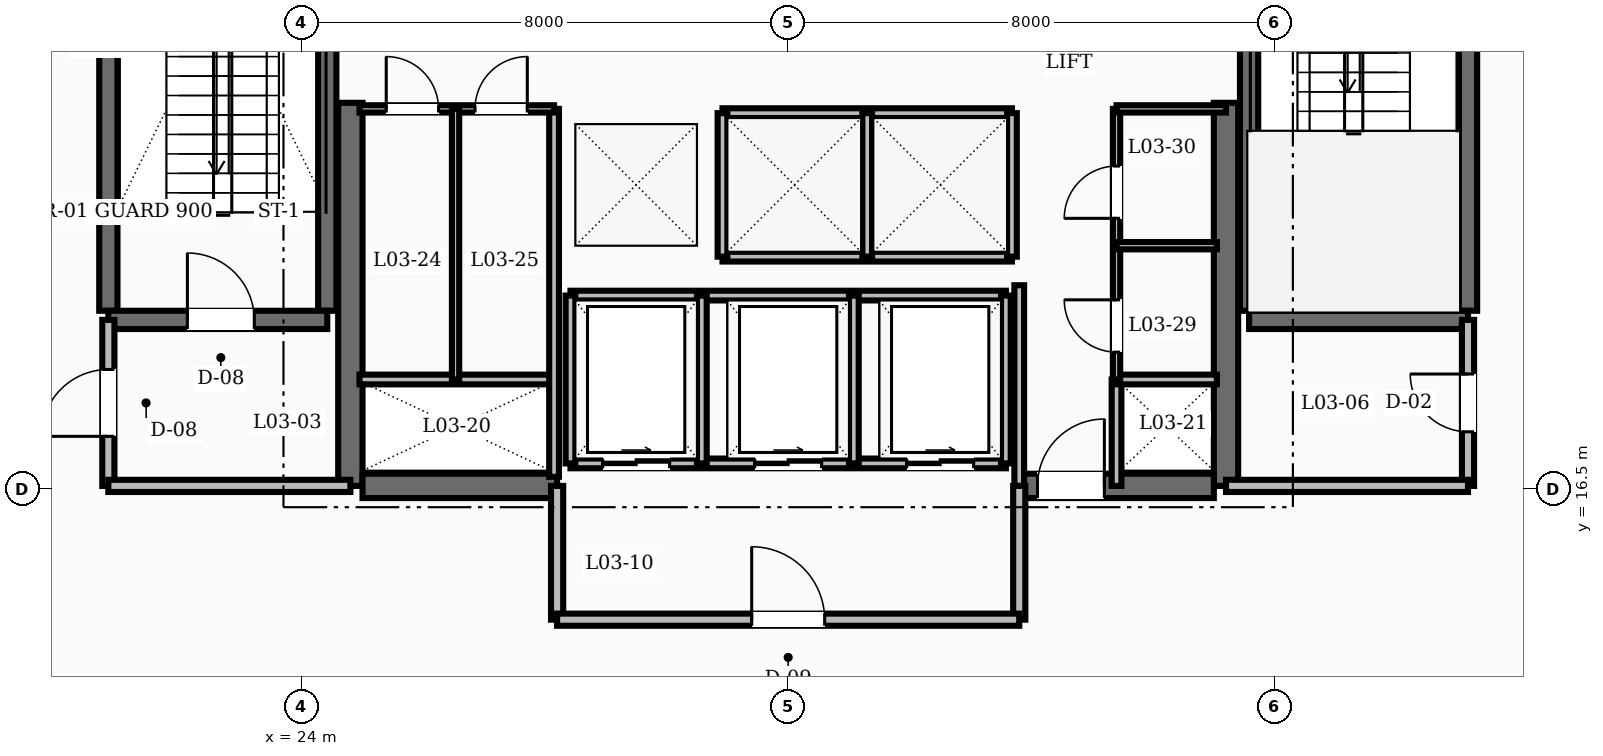
"""IFC4 building model, lengths in metres.
Left out: names, types, materials, properties, quantities, classifications, styles, units other than length and angle.
Written with IfcOpenShell. Run it as: python <this file> out.ifc"""

import sys

from ifc_helpers import new_model, si_unit, direction, frame, frame_2d, origin, place, context, subcontext, project, spatial, rectangle, extrude, element, fill, save


model = new_model("IFC4")
c1 = context("Model", 3, precision=1e-05, world=origin(), true_north=direction((0.0, 1.0)))
c2 = subcontext(c1, "Body", "Model", "MODEL_VIEW")
j1 = project(units=[si_unit("LENGTHUNIT", "METRE"), si_unit("PLANEANGLEUNIT", "RADIAN")], contexts=[c1])
p1 = place(None, origin())
s1 = spatial("IfcSite", under=j1, at=p1, CompositionType="ELEMENT")
p2 = place(p1, origin())
s2 = spatial("IfcBuilding", under=s1, at=p2, CompositionType="ELEMENT")
p3 = place(p2, frame((0.0, 0.0, 14.8)))
s3 = spatial("IfcBuildingStorey", under=s2, at=p3, CompositionType="ELEMENT", Elevation=14.8)
for number, where, z_axis, x_axis in (
    (1, (24.8, 16.55, 0.0), (0.0, 0.0, 1.0), (0.0, 1.0, 0.0)),
    (2, (39.2, 16.55, 0.0), (0.0, 0.0, 1.0), (0.0, 1.0, 0.0)),
):
    element("IfcWall", number, at=place(p3, frame(where, z_axis=z_axis, x_axis=x_axis)), inside=s3, PredefinedType="SHEAR", context=c2, shape_type="SweptSolid", body=[
        extrude(rectangle(XDim=6.3, YDim=0.4, at=frame_2d((3.15, 0.0))), origin(), (0.0, 0.0, 1.0), 4.8),
    ])
p4 = place(p3, frame((25.0, 16.55, 0.0), z_axis=(0.0, 0.0, 1.0), x_axis=(1.0, 0.0, 0.0)))
e3 = element("IfcWall", 3, at=p4, inside=s3, PredefinedType="SHEAR", context=c2, shape_type="SweptSolid", body=[
    extrude(rectangle(XDim=3.2, YDim=0.4, at=frame_2d((1.6, 0.0))), origin(), (0.0, 0.0, 1.0), 4.8),
])
p5 = place(p3, frame((35.8, 16.55, 0.0), z_axis=(0.0, 0.0, 1.0), x_axis=(1.0, 0.0, 0.0)))
e4 = element("IfcWall", 4, at=p5, inside=s3, PredefinedType="SHEAR", context=c2, shape_type="SweptSolid", body=[
    extrude(rectangle(XDim=3.2, YDim=0.4, at=frame_2d((1.6, 0.0))), origin(), (0.0, 0.0, 1.0), 4.8),
])
p6 = place(p5, frame((0.3, 0.0, 0.0)))
e5 = element("IfcOpeningElement", 5, at=p6, cuts=e4, PredefinedType="OPENING", context=c2, shape_type="SweptSolid", body=[
    extrude(rectangle(XDim=1.1, YDim=2.1, at=frame_2d((0.55, 1.05))), frame((0.0, 0.21, 0.0), z_axis=(0.0, -1.0, 0.0), x_axis=(1.0, 0.0, 0.0)), (0.0, 0.0, 1.0), 0.42),
])
for number, where, z_axis, x_axis in (
    (6, (20.82, 19.43, 0.0), (0.0, 0.0, 1.0), (0.0, 1.0, 0.0)),
    (7, (24.42, 19.43, 0.0), (0.0, 0.0, 1.0), (0.0, 1.0, 0.0)),
):
    element("IfcWall", number, at=place(p3, frame(where, z_axis=z_axis, x_axis=x_axis)), inside=s3, PredefinedType="SHEAR", context=c2, shape_type="SweptSolid", body=[
        extrude(rectangle(XDim=8.74, YDim=0.3, at=frame_2d((4.37, 0.0))), origin(), (0.0, 0.0, 1.0), 4.8),
    ])
p7 = place(p3, frame((20.82, 19.28, 0.0), z_axis=(0.0, 0.0, 1.0), x_axis=(1.0, 0.0, 0.0)))
e8 = element("IfcWall", 8, at=p7, inside=s3, PredefinedType="SHEAR", context=c2, shape_type="SweptSolid", body=[
    extrude(rectangle(XDim=3.6, YDim=0.3, at=frame_2d((1.8, 0.0))), origin(), (0.0, 0.0, 1.0), 4.8),
])
p8 = place(p7, frame((1.3, 0.0, 0.0)))
e9 = element("IfcOpeningElement", 9, at=p8, cuts=e8, PredefinedType="OPENING", context=c2, shape_type="SweptSolid", body=[
    extrude(rectangle(XDim=1.1, YDim=2.1, at=frame_2d((0.55, 1.05))), frame((0.0, 0.16, 0.0), z_axis=(0.0, -1.0, 0.0), x_axis=(1.0, 0.0, 0.0)), (0.0, 0.0, 1.0), 0.32),
])
for number, where, z_axis, x_axis in (
    (10, (43.18, 19.43, 0.0), (0.0, 0.0, 1.0), (0.0, 1.0, 0.0)),
    (11, (39.58, 19.43, 0.0), (0.0, 0.0, 1.0), (0.0, 1.0, 0.0)),
):
    element("IfcWall", number, at=place(p3, frame(where, z_axis=z_axis, x_axis=x_axis)), inside=s3, PredefinedType="SHEAR", context=c2, shape_type="SweptSolid", body=[
        extrude(rectangle(XDim=8.74, YDim=0.3, at=frame_2d((4.37, 0.0))), origin(), (0.0, 0.0, 1.0), 4.8),
    ])
p9 = place(p3, frame((39.58, 19.28, 0.0), z_axis=(0.0, 0.0, 1.0), x_axis=(1.0, 0.0, 0.0)))
e12 = element("IfcWall", 12, at=p9, inside=s3, PredefinedType="SHEAR", context=c2, shape_type="SweptSolid", body=[
    extrude(rectangle(XDim=3.6, YDim=0.3, at=frame_2d((1.8, 0.0))), origin(), (0.0, 0.0, 1.0), 4.8),
])
p10 = place(p3, frame((20.82, 16.55, 0.0), z_axis=(0.0, 0.0, 1.0), x_axis=(0.0, 1.0, 0.0)))
e13 = element("IfcWall", 13, at=p10, inside=s3, PredefinedType="SOLIDWALL", context=c2, shape_type="SweptSolid", body=[
    extrude(rectangle(XDim=2.73, YDim=0.2, at=frame_2d((1.365, 0.0))), origin(), (0.0, 0.0, 1.0), 3.52),
])
p11 = place(p10, frame((0.815, 0.0, 0.0)))
e14 = element("IfcOpeningElement", 14, at=p11, cuts=e13, PredefinedType="OPENING", context=c2, shape_type="SweptSolid", body=[
    extrude(rectangle(XDim=1.1, YDim=2.1, at=frame_2d((0.55, 1.05))), frame((0.0, 0.11, 0.0), z_axis=(0.0, -1.0, 0.0), x_axis=(1.0, 0.0, 0.0)), (0.0, 0.0, 1.0), 0.22),
])
p12 = place(p3, frame((20.82, 16.55, 0.0), z_axis=(0.0, 0.0, 1.0), x_axis=(1.0, 0.0, 0.0)))
e15 = element("IfcWall", 15, at=p12, inside=s3, PredefinedType="SOLIDWALL", context=c2, shape_type="SweptSolid", body=[
    extrude(rectangle(XDim=3.98, YDim=0.2, at=frame_2d((1.99, 0.0))), origin(), (0.0, 0.0, 1.0), 3.52),
])
p13 = place(p3, frame((43.18, 16.55, 0.0), z_axis=(0.0, 0.0, 1.0), x_axis=(0.0, 1.0, 0.0)))
e16 = element("IfcWall", 16, at=p13, inside=s3, PredefinedType="SOLIDWALL", context=c2, shape_type="SweptSolid", body=[
    extrude(rectangle(XDim=2.73, YDim=0.2, at=frame_2d((1.365, 0.0))), origin(), (0.0, 0.0, 1.0), 3.52),
])
p14 = place(p13, frame((0.89, 0.0, 0.0)))
e17 = element("IfcOpeningElement", 17, at=p14, cuts=e16, PredefinedType="OPENING", context=c2, shape_type="SweptSolid", body=[
    extrude(rectangle(XDim=0.95, YDim=2.1, at=frame_2d((0.475, 1.05))), frame((0.0, 0.11, 0.0), z_axis=(0.0, -1.0, 0.0), x_axis=(1.0, 0.0, 0.0)), (0.0, 0.0, 1.0), 0.22),
])
p15 = place(p3, frame((39.2, 16.55, 0.0), z_axis=(0.0, 0.0, 1.0), x_axis=(1.0, 0.0, 0.0)))
e18 = element("IfcWall", 18, at=p15, inside=s3, PredefinedType="SOLIDWALL", context=c2, shape_type="SweptSolid", body=[
    extrude(rectangle(XDim=3.98, YDim=0.2, at=frame_2d((1.99, 0.0))), origin(), (0.0, 0.0, 1.0), 3.52),
])
p16 = place(p3, frame((35.8, 16.55, 0.0), z_axis=(0.0, 0.0, 1.0), x_axis=(0.0, 1.0, 0.0)))
e19 = element("IfcWall", 19, at=p16, inside=s3, PredefinedType="SOLIDWALL", context=c2, shape_type="SweptSolid", body=[
    extrude(rectangle(XDim=3.3, YDim=0.16, at=frame_2d((1.65, 0.0))), origin(), (0.0, 0.0, 1.0), 3.52),
])
p17 = place(p3, frame((37.4, 16.55, 0.0), z_axis=(0.0, 0.0, 1.0), x_axis=(0.0, 1.0, 0.0)))
e20 = element("IfcWall", 20, at=p17, inside=s3, PredefinedType="SOLIDWALL", context=c2, shape_type="SweptSolid", body=[
    extrude(rectangle(XDim=1.75, YDim=0.16, at=frame_2d((0.875, 0.0))), origin(), (0.0, 0.0, 1.0), 3.52),
])
for number, where, z_axis, x_axis in (
    (21, (28.2, 14.35, 0.0), (0.0, 0.0, 1.0), (0.0, 1.0, 0.0)),
    (22, (35.8, 14.35, 0.0), (0.0, 0.0, 1.0), (0.0, 1.0, 0.0)),
):
    element("IfcWall", number, at=place(p3, frame(where, z_axis=z_axis, x_axis=x_axis)), inside=s3, PredefinedType="SOLIDWALL", context=c2, shape_type="SweptSolid", body=[
        extrude(rectangle(XDim=2.2, YDim=0.2, at=frame_2d((1.1, 0.0))), origin(), (0.0, 0.0, 1.0), 3.52),
    ])
p18 = place(p3, frame((28.2, 14.35, 0.0), z_axis=(0.0, 0.0, 1.0), x_axis=(1.0, 0.0, 0.0)))
e23 = element("IfcWall", 23, at=p18, inside=s3, PredefinedType="SOLIDWALL", context=c2, shape_type="SweptSolid", body=[
    extrude(rectangle(XDim=7.6, YDim=0.2, at=frame_2d((3.8, 0.0))), origin(), (0.0, 0.0, 1.0), 3.52),
])
p19 = place(p18, frame((3.2, 0.0, 0.0)))
e24 = element("IfcOpeningElement", 24, at=p19, cuts=e23, PredefinedType="OPENING", context=c2, shape_type="SweptSolid", body=[
    extrude(rectangle(XDim=1.2, YDim=2.1, at=frame_2d((0.6, 1.05))), frame((0.0, 0.11, 0.0), z_axis=(0.0, -1.0, 0.0), x_axis=(1.0, 0.0, 0.0)), (0.0, 0.0, 1.0), 0.22),
])
for number, where, z_axis, x_axis in (
    (25, (30.92, 22.68, 0.0), (0.0, 0.0, 1.0), (1.0, 0.0, 0.0)),
    (26, (30.92, 20.32, 0.0), (0.0, 0.0, 1.0), (1.0, 0.0, 0.0)),
):
    element("IfcWall", number, at=place(p3, frame(where, z_axis=z_axis, x_axis=x_axis)), inside=s3, PredefinedType="SOLIDWALL", context=c2, shape_type="SweptSolid", body=[
        extrude(rectangle(XDim=4.76, YDim=0.16, at=frame_2d((2.38, 0.0))), origin(), (0.0, 0.0, 1.0), 3.52),
    ])
for number, where, z_axis, x_axis in (
    (27, (30.92, 20.32, 0.0), (0.0, 0.0, 1.0), (0.0, 1.0, 0.0)),
    (28, (33.3, 20.32, 0.0), (0.0, 0.0, 1.0), (0.0, 1.0, 0.0)),
    (29, (35.68, 20.32, 0.0), (0.0, 0.0, 1.0), (0.0, 1.0, 0.0)),
):
    element("IfcWall", number, at=place(p3, frame(where, z_axis=z_axis, x_axis=x_axis)), inside=s3, PredefinedType="SOLIDWALL", context=c2, shape_type="SweptSolid", body=[
        extrude(rectangle(XDim=2.36, YDim=0.16, at=frame_2d((1.18, 0.0))), origin(), (0.0, 0.0, 1.0), 3.52),
    ])
p20 = place(p3, frame((28.42, 16.92, 0.0), z_axis=(0.0, 0.0, 1.0), x_axis=(1.0, 0.0, 0.0)))
e30 = element("IfcWall", 30, at=p20, inside=s3, PredefinedType="SOLIDWALL", context=c2, shape_type="SweptSolid", body=[
    extrude(rectangle(XDim=7.16, YDim=0.16, at=frame_2d((3.58, 0.0))), origin(), (0.0, 0.0, 1.0), 3.52),
])
p21 = place(p20, frame((0.53, 0.0, 0.0)))
e31 = element("IfcOpeningElement", 31, at=p21, cuts=e30, PredefinedType="OPENING", context=c2, shape_type="SweptSolid", body=[
    extrude(rectangle(XDim=1.1, YDim=2.15, at=frame_2d((0.55, 1.075))), frame((0.0, 0.09, 0.0), z_axis=(0.0, -1.0, 0.0), x_axis=(1.0, 0.0, 0.0)), (0.0, 0.0, 1.0), 0.18),
])
p22 = place(p20, frame((3.03, 0.0, 0.0)))
e32 = element("IfcOpeningElement", 32, at=p22, cuts=e30, PredefinedType="OPENING", context=c2, shape_type="SweptSolid", body=[
    extrude(rectangle(XDim=1.1, YDim=2.15, at=frame_2d((0.55, 1.075))), frame((0.0, 0.09, 0.0), z_axis=(0.0, -1.0, 0.0), x_axis=(1.0, 0.0, 0.0)), (0.0, 0.0, 1.0), 0.18),
])
p23 = place(p20, frame((5.53, 0.0, 0.0)))
e33 = element("IfcOpeningElement", 33, at=p23, cuts=e30, PredefinedType="OPENING", context=c2, shape_type="SweptSolid", body=[
    extrude(rectangle(XDim=1.1, YDim=2.15, at=frame_2d((0.55, 1.075))), frame((0.0, 0.09, 0.0), z_axis=(0.0, -1.0, 0.0), x_axis=(1.0, 0.0, 0.0)), (0.0, 0.0, 1.0), 0.18),
])
p24 = place(p3, frame((28.42, 19.68, 0.0), z_axis=(0.0, 0.0, 1.0), x_axis=(1.0, 0.0, 0.0)))
e34 = element("IfcWall", 34, at=p24, inside=s3, PredefinedType="SOLIDWALL", context=c2, shape_type="SweptSolid", body=[
    extrude(rectangle(XDim=7.16, YDim=0.16, at=frame_2d((3.58, 0.0))), origin(), (0.0, 0.0, 1.0), 3.52),
])
for number, where, z_axis, x_axis in (
    (35, (28.42, 16.92, 0.0), (0.0, 0.0, 1.0), (0.0, 1.0, 0.0)),
    (36, (30.58, 16.92, 0.0), (0.0, 0.0, 1.0), (0.0, 1.0, 0.0)),
    (37, (33.08, 16.92, 0.0), (0.0, 0.0, 1.0), (0.0, 1.0, 0.0)),
    (38, (35.58, 16.92, 0.0), (0.0, 0.0, 1.0), (0.0, 1.0, 0.0)),
):
    element("IfcWall", number, at=place(p3, frame(where, z_axis=z_axis, x_axis=x_axis)), inside=s3, PredefinedType="SOLIDWALL", context=c2, shape_type="SweptSolid", body=[
        extrude(rectangle(XDim=2.76, YDim=0.16, at=frame_2d((1.38, 0.0))), origin(), (0.0, 0.0, 1.0), 3.52),
    ])
p25 = place(p3, frame((24.95, 18.3, 0.0), z_axis=(0.0, 0.0, 1.0), x_axis=(1.0, 0.0, 0.0)))
e39 = element("IfcWall", 39, at=p25, inside=s3, PredefinedType="SOLIDWALL", context=c2, shape_type="SweptSolid", body=[
    extrude(rectangle(XDim=3.2, YDim=0.16, at=frame_2d((1.6, 0.0))), origin(), (0.0, 0.0, 1.0), 3.52),
])
p26 = place(p3, frame((28.15, 16.7, 0.0), z_axis=(0.0, 0.0, 1.0), x_axis=(0.0, 1.0, 0.0)))
e40 = element("IfcWall", 40, at=p26, inside=s3, PredefinedType="SOLIDWALL", context=c2, shape_type="SweptSolid", body=[
    extrude(rectangle(XDim=6.05, YDim=0.16, at=frame_2d((3.025, 0.0))), origin(), (0.0, 0.0, 1.0), 3.52),
])
p27 = place(p3, frame((37.4, 18.3, 0.0), z_axis=(0.0, 0.0, 1.0), x_axis=(1.0, 0.0, 0.0)))
e41 = element("IfcWall", 41, at=p27, inside=s3, PredefinedType="SOLIDWALL", context=c2, shape_type="SweptSolid", body=[
    extrude(rectangle(XDim=1.65, YDim=0.16, at=frame_2d((0.825, 0.0))), origin(), (0.0, 0.0, 1.0), 3.52),
])
p28 = place(p3, frame((24.95, 22.75, 0.0), z_axis=(0.0, 0.0, 1.0), x_axis=(1.0, 0.0, 0.0)))
e42 = element("IfcWall", 42, at=p28, inside=s3, PredefinedType="PARTITIONING", context=c2, shape_type="SweptSolid", body=[
    extrude(rectangle(XDim=3.2, YDim=0.12, at=frame_2d((1.6, 0.0))), origin(), (0.0, 0.0, 1.0), 3.52),
])
p29 = place(p28, frame((0.44, 0.0, 0.0)))
e43 = element("IfcOpeningElement", 43, at=p29, cuts=e42, PredefinedType="OPENING", context=c2, shape_type="SweptSolid", body=[
    extrude(rectangle(XDim=0.86, YDim=2.1, at=frame_2d((0.43, 1.05))), frame((0.0, 0.07, 0.0), z_axis=(0.0, -1.0, 0.0), x_axis=(1.0, 0.0, 0.0)), (0.0, 0.0, 1.0), 0.14),
])
p30 = place(p28, frame((1.9, 0.0, 0.0)))
e44 = element("IfcOpeningElement", 44, at=p30, cuts=e42, PredefinedType="OPENING", context=c2, shape_type="SweptSolid", body=[
    extrude(rectangle(XDim=0.86, YDim=2.1, at=frame_2d((0.43, 1.05))), frame((0.0, 0.07, 0.0), z_axis=(0.0, -1.0, 0.0), x_axis=(1.0, 0.0, 0.0)), (0.0, 0.0, 1.0), 0.14),
])
p31 = place(p3, frame((37.4, 18.3, 0.0), z_axis=(0.0, 0.0, 1.0), x_axis=(0.0, 1.0, 0.0)))
e45 = element("IfcWall", 45, at=p31, inside=s3, PredefinedType="PARTITIONING", context=c2, shape_type="SweptSolid", body=[
    extrude(rectangle(XDim=4.45, YDim=0.12, at=frame_2d((2.225, 0.0))), origin(), (0.0, 0.0, 1.0), 3.52),
])
p32 = place(p31, frame((0.45, 0.0, 0.0)))
e46 = element("IfcOpeningElement", 46, at=p32, cuts=e45, PredefinedType="OPENING", context=c2, shape_type="SweptSolid", body=[
    extrude(rectangle(XDim=0.86, YDim=2.1, at=frame_2d((0.43, 1.05))), frame((0.0, 0.07, 0.0), z_axis=(0.0, -1.0, 0.0), x_axis=(1.0, 0.0, 0.0)), (0.0, 0.0, 1.0), 0.14),
])
p33 = place(p31, frame((2.65, 0.0, 0.0)))
e47 = element("IfcOpeningElement", 47, at=p33, cuts=e45, PredefinedType="OPENING", context=c2, shape_type="SweptSolid", body=[
    extrude(rectangle(XDim=0.86, YDim=2.1, at=frame_2d((0.43, 1.05))), frame((0.0, 0.07, 0.0), z_axis=(0.0, -1.0, 0.0), x_axis=(1.0, 0.0, 0.0)), (0.0, 0.0, 1.0), 0.14),
])
p34 = place(p3, frame((37.4, 22.75, 0.0), z_axis=(0.0, 0.0, 1.0), x_axis=(1.0, 0.0, 0.0)))
e48 = element("IfcWall", 48, at=p34, inside=s3, PredefinedType="PARTITIONING", context=c2, shape_type="SweptSolid", body=[
    extrude(rectangle(XDim=1.8, YDim=0.12, at=frame_2d((0.9, 0.0))), origin(), (0.0, 0.0, 1.0), 3.52),
])
p35 = place(p3, frame((26.53, 18.3, 0.0), z_axis=(0.0, 0.0, 1.0), x_axis=(0.0, 1.0, 0.0)))
e49 = element("IfcWall", 49, at=p35, inside=s3, PredefinedType="PARTITIONING", context=c2, shape_type="SweptSolid", body=[
    extrude(rectangle(XDim=4.45, YDim=0.12, at=frame_2d((2.225, 0.0))), origin(), (0.0, 0.0, 1.0), 3.52),
])
p36 = place(p3, frame((37.4, 20.5, 0.0), z_axis=(0.0, 0.0, 1.0), x_axis=(1.0, 0.0, 0.0)))
e50 = element("IfcWall", 50, at=p36, inside=s3, PredefinedType="PARTITIONING", context=c2, shape_type="SweptSolid", body=[
    extrude(rectangle(XDim=1.65, YDim=0.12, at=frame_2d((0.825, 0.0))), origin(), (0.0, 0.0, 1.0), 3.52),
])
p37 = place(p8, origin())
e51 = element("IfcDoor", 51, at=p37, inside=s3, OperationType="SINGLE_SWING_LEFT", PredefinedType="DOOR", context=c2, shape_type="SweptSolid", body=[
    extrude(rectangle(XDim=1.1, YDim=2.1, at=frame_2d((0.55, 1.05))), frame((0.0, 0.025, 0.0), z_axis=(0.0, -1.0, 0.0), x_axis=(1.0, 0.0, 0.0)), (0.0, 0.0, 1.0), 0.05),
])
fill(e9, e51)
p38 = place(p11, origin())
e52 = element("IfcDoor", 52, at=p38, inside=s3, OperationType="SINGLE_SWING_LEFT", PredefinedType="DOOR", context=c2, shape_type="SweptSolid", body=[
    extrude(rectangle(XDim=1.1, YDim=2.1, at=frame_2d((0.55, 1.05))), frame((0.0, 0.025, 0.0), z_axis=(0.0, -1.0, 0.0), x_axis=(1.0, 0.0, 0.0)), (0.0, 0.0, 1.0), 0.05),
])
fill(e14, e52)
p39 = place(p14, origin())
e53 = element("IfcDoor", 53, at=p39, inside=s3, OperationType="SINGLE_SWING_RIGHT", PredefinedType="DOOR", context=c2, shape_type="SweptSolid", body=[
    extrude(rectangle(XDim=0.95, YDim=2.1, at=frame_2d((0.475, 1.05))), frame((0.0, 0.025, 0.0), z_axis=(0.0, -1.0, 0.0), x_axis=(1.0, 0.0, 0.0)), (0.0, 0.0, 1.0), 0.05),
])
fill(e17, e53)
p40 = place(p6, origin())
e54 = element("IfcDoor", 54, at=p40, inside=s3, OperationType="SINGLE_SWING_RIGHT", PredefinedType="DOOR", context=c2, shape_type="SweptSolid", body=[
    extrude(rectangle(XDim=1.1, YDim=2.1, at=frame_2d((0.55, 1.05))), frame((0.0, 0.025, 0.0), z_axis=(0.0, -1.0, 0.0), x_axis=(1.0, 0.0, 0.0)), (0.0, 0.0, 1.0), 0.05),
])
fill(e5, e54)
p41 = place(p19, origin())
e55 = element("IfcDoor", 55, at=p41, inside=s3, OperationType="SINGLE_SWING_LEFT", PredefinedType="DOOR", context=c2, shape_type="SweptSolid", body=[
    extrude(rectangle(XDim=1.2, YDim=2.1, at=frame_2d((0.6, 1.05))), frame((0.0, 0.025, 0.0), z_axis=(0.0, -1.0, 0.0), x_axis=(1.0, 0.0, 0.0)), (0.0, 0.0, 1.0), 0.05),
])
fill(e24, e55)
p42 = place(p21, origin())
e56 = element("IfcDoor", 56, at=p42, inside=s3, OperationType="SLIDING_TO_RIGHT", PredefinedType="DOOR", context=c2, shape_type="SweptSolid", body=[
    extrude(rectangle(XDim=1.1, YDim=2.15, at=frame_2d((0.55, 1.075))), frame((0.0, 0.025, 0.0), z_axis=(0.0, -1.0, 0.0), x_axis=(1.0, 0.0, 0.0)), (0.0, 0.0, 1.0), 0.05),
])
fill(e31, e56)
p43 = place(p22, origin())
e57 = element("IfcDoor", 57, at=p43, inside=s3, OperationType="SLIDING_TO_RIGHT", PredefinedType="DOOR", context=c2, shape_type="SweptSolid", body=[
    extrude(rectangle(XDim=1.1, YDim=2.15, at=frame_2d((0.55, 1.075))), frame((0.0, 0.025, 0.0), z_axis=(0.0, -1.0, 0.0), x_axis=(1.0, 0.0, 0.0)), (0.0, 0.0, 1.0), 0.05),
])
fill(e32, e57)
p44 = place(p23, origin())
e58 = element("IfcDoor", 58, at=p44, inside=s3, OperationType="SLIDING_TO_RIGHT", PredefinedType="DOOR", context=c2, shape_type="SweptSolid", body=[
    extrude(rectangle(XDim=1.1, YDim=2.15, at=frame_2d((0.55, 1.075))), frame((0.0, 0.025, 0.0), z_axis=(0.0, -1.0, 0.0), x_axis=(1.0, 0.0, 0.0)), (0.0, 0.0, 1.0), 0.05),
])
fill(e33, e58)
p45 = place(p29, origin())
e59 = element("IfcDoor", 59, at=p45, inside=s3, OperationType="SINGLE_SWING_LEFT", PredefinedType="DOOR", context=c2, shape_type="SweptSolid", body=[
    extrude(rectangle(XDim=0.86, YDim=2.1, at=frame_2d((0.43, 1.05))), frame((0.0, 0.025, 0.0), z_axis=(0.0, -1.0, 0.0), x_axis=(1.0, 0.0, 0.0)), (0.0, 0.0, 1.0), 0.05),
])
fill(e43, e59)
p46 = place(p30, origin())
e60 = element("IfcDoor", 60, at=p46, inside=s3, OperationType="SINGLE_SWING_RIGHT", PredefinedType="DOOR", context=c2, shape_type="SweptSolid", body=[
    extrude(rectangle(XDim=0.86, YDim=2.1, at=frame_2d((0.43, 1.05))), frame((0.0, 0.025, 0.0), z_axis=(0.0, -1.0, 0.0), x_axis=(1.0, 0.0, 0.0)), (0.0, 0.0, 1.0), 0.05),
])
fill(e44, e60)
p47 = place(p32, origin())
e61 = element("IfcDoor", 61, at=p47, inside=s3, OperationType="SINGLE_SWING_RIGHT", PredefinedType="DOOR", context=c2, shape_type="SweptSolid", body=[
    extrude(rectangle(XDim=0.86, YDim=2.1, at=frame_2d((0.43, 1.05))), frame((0.0, 0.025, 0.0), z_axis=(0.0, -1.0, 0.0), x_axis=(1.0, 0.0, 0.0)), (0.0, 0.0, 1.0), 0.05),
])
fill(e46, e61)
p48 = place(p33, origin())
e62 = element("IfcDoor", 62, at=p48, inside=s3, OperationType="SINGLE_SWING_LEFT", PredefinedType="DOOR", context=c2, shape_type="SweptSolid", body=[
    extrude(rectangle(XDim=0.86, YDim=2.1, at=frame_2d((0.43, 1.05))), frame((0.0, 0.025, 0.0), z_axis=(0.0, -1.0, 0.0), x_axis=(1.0, 0.0, 0.0)), (0.0, 0.0, 1.0), 0.05),
])
fill(e47, e62)
save(model, sys.argv[1])
